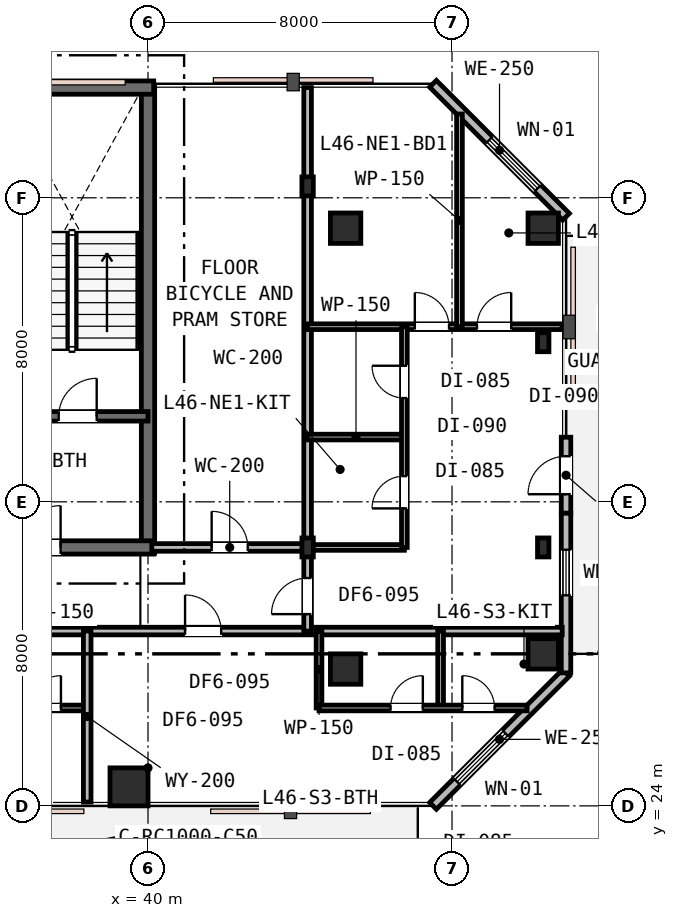
"""IFC4 building model, lengths in metres.
Left out: names, types, materials, properties, quantities, classifications, styles, units other than length and angle.
Written with IfcOpenShell. Run it as: python <this file> out.ifc"""

import sys

from ifc_helpers import new_model, si_unit, direction, frame, frame_2d, origin, origin_2d, place, context, subcontext, project, spatial, rectangle, i_section, extrude, element, fill, save


model = new_model("IFC4")
c1 = context("Model", 3, precision=1e-05, world=origin(), true_north=direction((0.0, 1.0)))
c2 = subcontext(c1, "Body", "Model", "MODEL_VIEW")
j1 = project(units=[si_unit("LENGTHUNIT", "METRE"), si_unit("PLANEANGLEUNIT", "RADIAN")], contexts=[c1])
p1 = place(None, origin())
s1 = spatial("IfcSite", under=j1, at=p1, CompositionType="ELEMENT")
p2 = place(p1, origin())
s2 = spatial("IfcBuilding", under=s1, at=p2, CompositionType="ELEMENT")
p3 = place(p2, frame((0.0, 0.0, 179.4)))
s3 = spatial("IfcBuildingStorey", under=s2, at=p3, CompositionType="ELEMENT", Elevation=179.4)
p4 = place(p3, frame((40.0, 30.65, 0.0), z_axis=(0.0, 0.0, 1.0), x_axis=(0.0, 1.0, 0.0)))
e1 = element("IfcWall", 1, at=p4, inside=s3, PredefinedType="SHEAR", context=c2, shape_type="SweptSolid", body=[
    extrude(rectangle(XDim=12.3, YDim=0.35, at=frame_2d((6.15, 0.0))), origin(), (0.0, 0.0, 1.0), 3.6),
])
p5 = place(p3, frame((15.85, 42.9, 0.0), z_axis=(0.0, 0.0, 1.0), x_axis=(1.0, 0.0, 0.0)))
e2 = element("IfcWall", 2, at=p5, inside=s3, PredefinedType="SHEAR", context=c2, shape_type="SweptSolid", body=[
    extrude(rectangle(XDim=24.3, YDim=0.35, at=frame_2d((12.15, 0.0))), origin(), (0.0, 0.0, 1.0), 3.6),
])
p6 = place(p3, frame((28.95, 30.8, 0.0), z_axis=(0.0, 0.0, 1.0), x_axis=(1.0, 0.0, 0.0)))
e3 = element("IfcWall", 3, at=p6, inside=s3, PredefinedType="SHEAR", context=c2, shape_type="SweptSolid", body=[
    extrude(rectangle(XDim=11.2, YDim=0.35, at=frame_2d((5.6, 0.0))), origin(), (0.0, 0.0, 1.0), 3.6),
])
p7 = place(p6, frame((7.65, 0.0, 0.0)))
e4 = element("IfcOpeningElement", 4, at=p7, cuts=e3, PredefinedType="OPENING", context=c2, shape_type="SweptSolid", body=[
    extrude(rectangle(XDim=1.1, YDim=2.15, at=frame_2d((0.55, 1.075))), frame((0.0, 0.185, 0.0), z_axis=(0.0, -1.0, 0.0), x_axis=(1.0, 0.0, 0.0)), (0.0, 0.0, 1.0), 0.37),
])
p8 = place(p3, frame((33.95, 34.25, 0.0), z_axis=(0.0, 0.0, 1.0), x_axis=(1.0, 0.0, 0.0)))
e5 = element("IfcWall", 5, at=p8, inside=s3, PredefinedType="SHEAR", context=c2, shape_type="SweptSolid", body=[
    extrude(rectangle(XDim=6.05, YDim=0.25, at=frame_2d((3.025, 0.0))), origin(), (0.0, 0.0, 1.0), 3.6),
])
p9 = place(p8, frame((3.7, 0.0, 0.0)))
e6 = element("IfcOpeningElement", 6, at=p9, cuts=e5, PredefinedType="OPENING", context=c2, shape_type="SweptSolid", body=[
    extrude(rectangle(XDim=1.0, YDim=2.15, at=frame_2d((0.5, 1.075))), frame((0.0, 0.135, 0.0), z_axis=(0.0, -1.0, 0.0), x_axis=(1.0, 0.0, 0.0)), (0.0, 0.0, 1.0), 0.27),
])
p10 = place(p8, frame((0.55, 0.0, 0.0)))
e7 = element("IfcOpeningElement", 7, at=p10, cuts=e5, PredefinedType="OPENING", context=c2, shape_type="SweptSolid", body=[
    extrude(rectangle(XDim=1.1, YDim=2.15, at=frame_2d((0.55, 1.075))), frame((0.0, 0.135, 0.0), z_axis=(0.0, -1.0, 0.0), x_axis=(1.0, 0.0, 0.0)), (0.0, 0.0, 1.0), 0.27),
])
p11 = place(p3, frame((39.5, 24.5, 0.0), z_axis=(0.0, 0.0, 1.0), x_axis=(1.0, 0.0, 0.0)))
e8 = element("IfcColumn", 8, at=p11, inside=s3, PredefinedType="COLUMN", context=c2, shape_type="SweptSolid", body=[
    extrude(rectangle(XDim=1.0, YDim=1.0, at=origin_2d()), origin(), (0.0, 0.0, 1.0), 3.6),
])
for number, where, z_axis, x_axis in (
    (9, (45.2, 27.6, 0.0), (0.0, 0.0, 1.0), (1.0, 0.0, 0.0)),
    (10, (45.2, 39.2, 0.0), (0.0, 0.0, 1.0), (1.0, 0.0, 0.0)),
    (11, (50.4, 28.0, 0.0), (0.0, 0.0, 1.0), (1.0, 0.0, 0.0)),
    (12, (50.4, 39.2, 0.0), (0.0, 0.0, 1.0), (1.0, 0.0, 0.0)),
):
    element("IfcColumn", number, at=place(p3, frame(where, z_axis=z_axis, x_axis=x_axis)), inside=s3, PredefinedType="COLUMN", context=c2, shape_type="SweptSolid", body=[
        extrude(rectangle(XDim=0.8, YDim=0.8, at=origin_2d()), origin(), (0.0, 0.0, 1.0), 3.6),
    ])
for number, where, z_axis, x_axis in (
    (13, (44.2, 30.8, 0.0), (0.0, 0.0, 1.0), (1.0, 0.0, 0.0)),
    (14, (44.2, 40.3, 0.0), (0.0, 0.0, 1.0), (1.0, 0.0, 0.0)),
    (15, (50.4, 30.8, 0.0), (0.0, 0.0, 1.0), (1.0, 0.0, 0.0)),
    (16, (50.4, 36.2, 0.0), (0.0, 0.0, 1.0), (1.0, 0.0, 0.0)),
):
    element("IfcColumn", number, at=place(p3, frame(where, z_axis=z_axis, x_axis=x_axis)), inside=s3, PredefinedType="COLUMN", context=c2, shape_type="SweptSolid", body=[
        extrude(i_section(OverallWidth=0.3, OverallDepth=0.5, WebThickness=0.015, FlangeThickness=0.028, FilletRadius=0.027, at=origin_2d()), origin(), (0.0, 0.0, 1.0), 3.6),
    ])
p12 = place(p3, frame((47.5, 24.0, 0.0), z_axis=(0.0, 0.0, 1.0), x_axis=(0.707106781187, 0.707106781187, 0.0)))
e17 = element("IfcWall", 17, at=p12, inside=s3, PredefinedType="STANDARD", context=c2, shape_type="SweptSolid", body=[
    extrude(rectangle(XDim=4.95, YDim=0.25, at=frame_2d((2.475, 0.0))), origin(), (0.0, 0.0, 1.0), 3.33),
])
p13 = place(p12, frame((0.896, 0.0, 0.75)))
e18 = element("IfcOpeningElement", 18, at=p13, cuts=e17, PredefinedType="OPENING", context=c2, shape_type="SweptSolid", body=[
    extrude(rectangle(XDim=1.8, YDim=1.85, at=frame_2d((0.9, 0.925))), frame((0.0, 0.135, 0.0), z_axis=(0.0, -1.0, 0.0), x_axis=(1.0, 0.0, 0.0)), (0.0, 0.0, 1.0), 0.27),
])
p14 = place(p3, frame((51.0, 31.7, 0.0), z_axis=(0.0, 0.0, 1.0), x_axis=(0.0, 1.0, 0.0)))
e19 = element("IfcWall", 19, at=p14, inside=s3, PredefinedType="STANDARD", context=c2, shape_type="SweptSolid", body=[
    extrude(rectangle(XDim=2.0, YDim=0.25, at=frame_2d((1.0, 0.0))), origin(), (0.0, 0.0, 1.0), 3.33),
])
p15 = place(p14, frame((0.5, 0.0, 0.0)))
e20 = element("IfcOpeningElement", 20, at=p15, cuts=e19, PredefinedType="OPENING", context=c2, shape_type="SweptSolid", body=[
    extrude(rectangle(XDim=1.0, YDim=2.15, at=frame_2d((0.5, 1.075))), frame((0.0, 0.135, 0.0), z_axis=(0.0, -1.0, 0.0), x_axis=(1.0, 0.0, 0.0)), (0.0, 0.0, 1.0), 0.27),
])
p16 = place(p3, frame((51.0, 27.5, 0.0), z_axis=(0.0, 0.0, 1.0), x_axis=(0.0, 1.0, 0.0)))
e21 = element("IfcWall", 21, at=p16, inside=s3, PredefinedType="STANDARD", context=c2, shape_type="SweptSolid", body=[
    extrude(rectangle(XDim=4.2, YDim=0.25, at=frame_2d((2.1, 0.0))), origin(), (0.0, 0.0, 1.0), 3.33),
])
p17 = place(p16, frame((2.04, 0.0, 0.85)))
e22 = element("IfcOpeningElement", 22, at=p17, cuts=e21, PredefinedType="OPENING", context=c2, shape_type="SweptSolid", body=[
    extrude(rectangle(XDim=1.2, YDim=1.6, at=frame_2d((0.6, 0.8))), frame((0.0, 0.135, 0.0), z_axis=(0.0, -1.0, 0.0), x_axis=(1.0, 0.0, 0.0)), (0.0, 0.0, 1.0), 0.27),
])
p18 = place(p3, frame((51.0, 39.5, 0.0), z_axis=(0.0, 0.0, 1.0), x_axis=(-0.707106781187, 0.707106781187, 0.0)))
e23 = element("IfcWall", 23, at=p18, inside=s3, PredefinedType="STANDARD", context=c2, shape_type="SweptSolid", body=[
    extrude(rectangle(XDim=4.95, YDim=0.25, at=frame_2d((2.475, 0.0))), origin(), (0.0, 0.0, 1.0), 3.33),
])
p19 = place(p18, frame((1.057, 0.0, 0.75)))
e24 = element("IfcOpeningElement", 24, at=p19, cuts=e23, PredefinedType="OPENING", context=c2, shape_type="SweptSolid", body=[
    extrude(rectangle(XDim=1.8, YDim=1.85, at=frame_2d((0.9, 0.925))), frame((0.0, 0.135, 0.0), z_axis=(0.0, -1.0, 0.0), x_axis=(1.0, 0.0, 0.0)), (0.0, 0.0, 1.0), 0.27),
])
p20 = place(p3, frame((21.6, 28.6, 0.0), z_axis=(0.0, 0.0, 1.0), x_axis=(1.0, 0.0, 0.0)))
e25 = element("IfcWall", 25, at=p20, inside=s3, PredefinedType="PARTITIONING", context=c2, shape_type="SweptSolid", body=[
    extrude(rectangle(XDim=29.3, YDim=0.2, at=frame_2d((14.65, 0.0))), origin(), (0.0, 0.0, 1.0), 2.92),
])
p21 = place(p20, frame((3.293, 0.0, 0.0)))
e26 = element("IfcOpeningElement", 26, at=p21, cuts=e25, PredefinedType="OPENING", context=c2, shape_type="SweptSolid", body=[
    extrude(rectangle(XDim=0.95, YDim=2.15, at=frame_2d((0.475, 1.075))), frame((0.0, 0.11, 0.0), z_axis=(0.0, -1.0, 0.0), x_axis=(1.0, 0.0, 0.0)), (0.0, 0.0, 1.0), 0.22),
])
p22 = place(p20, frame((10.493, 0.0, 0.0)))
e27 = element("IfcOpeningElement", 27, at=p22, cuts=e25, PredefinedType="OPENING", context=c2, shape_type="SweptSolid", body=[
    extrude(rectangle(XDim=0.95, YDim=2.15, at=frame_2d((0.475, 1.075))), frame((0.0, 0.11, 0.0), z_axis=(0.0, -1.0, 0.0), x_axis=(1.0, 0.0, 0.0)), (0.0, 0.0, 1.0), 0.22),
])
p23 = place(p20, frame((19.375, 0.0, 0.0)))
e28 = element("IfcOpeningElement", 28, at=p23, cuts=e25, PredefinedType="OPENING", context=c2, shape_type="SweptSolid", body=[
    extrude(rectangle(XDim=0.95, YDim=2.15, at=frame_2d((0.475, 1.075))), frame((0.0, 0.11, 0.0), z_axis=(0.0, -1.0, 0.0), x_axis=(1.0, 0.0, 0.0)), (0.0, 0.0, 1.0), 0.22),
])
p24 = place(p3, frame((40.1, 30.8, 0.0), z_axis=(0.0, 0.0, 1.0), x_axis=(1.0, 0.0, 0.0)))
e29 = element("IfcWall", 29, at=p24, inside=s3, PredefinedType="PARTITIONING", context=c2, shape_type="SweptSolid", body=[
    extrude(rectangle(XDim=4.1, YDim=0.2, at=frame_2d((2.05, 0.0))), origin(), (0.0, 0.0, 1.0), 2.92),
])
p25 = place(p24, frame((1.575, 0.0, 0.0)))
e30 = element("IfcOpeningElement", 30, at=p25, cuts=e29, PredefinedType="OPENING", context=c2, shape_type="SweptSolid", body=[
    extrude(rectangle(XDim=0.95, YDim=2.15, at=frame_2d((0.475, 1.075))), frame((0.0, 0.11, 0.0), z_axis=(0.0, -1.0, 0.0), x_axis=(1.0, 0.0, 0.0)), (0.0, 0.0, 1.0), 0.22),
])
p26 = place(p3, frame((44.2, 28.6, 0.0), z_axis=(0.0, 0.0, 1.0), x_axis=(0.0, 1.0, 0.0)))
e31 = element("IfcWall", 31, at=p26, inside=s3, PredefinedType="PARTITIONING", context=c2, shape_type="SweptSolid", body=[
    extrude(rectangle(XDim=14.3, YDim=0.2, at=frame_2d((7.15, 0.0))), origin(), (0.0, 0.0, 1.0), 2.92),
])
p27 = place(p26, frame((0.445, 0.0, 0.0)))
e32 = element("IfcOpeningElement", 32, at=p27, cuts=e31, PredefinedType="OPENING", context=c2, shape_type="SweptSolid", body=[
    extrude(rectangle(XDim=0.95, YDim=2.15, at=frame_2d((0.475, 1.075))), frame((0.0, 0.11, 0.0), z_axis=(0.0, -1.0, 0.0), x_axis=(1.0, 0.0, 0.0)), (0.0, 0.0, 1.0), 0.22),
])
for number, where, z_axis, x_axis in (
    (33, (44.2, 30.8, 0.0), (0.0, 0.0, 1.0), (1.0, 0.0, 0.0)),
    (34, (44.2, 33.704, 0.0), (0.0, 0.0, 1.0), (1.0, 0.0, 0.0)),
):
    element("IfcWall", number, at=place(p3, frame(where, z_axis=z_axis, x_axis=x_axis)), inside=s3, PredefinedType="PARTITIONING", context=c2, shape_type="SweptSolid", body=[
        extrude(rectangle(XDim=2.546, YDim=0.15, at=frame_2d((1.273, 0.0))), origin(), (0.0, 0.0, 1.0), 2.92),
    ])
p28 = place(p3, frame((44.2, 36.608, 0.0), z_axis=(0.0, 0.0, 1.0), x_axis=(1.0, 0.0, 0.0)))
e35 = element("IfcWall", 35, at=p28, inside=s3, PredefinedType="PARTITIONING", context=c2, shape_type="SweptSolid", body=[
    extrude(rectangle(XDim=6.7, YDim=0.15, at=frame_2d((3.35, 0.0))), origin(), (0.0, 0.0, 1.0), 2.92),
])
p29 = place(p28, frame((2.821, 0.0, 0.0)))
e36 = element("IfcOpeningElement", 36, at=p29, cuts=e35, PredefinedType="OPENING", context=c2, shape_type="SweptSolid", body=[
    extrude(rectangle(XDim=0.9, YDim=2.15, at=frame_2d((0.45, 1.075))), frame((0.0, 0.085, 0.0), z_axis=(0.0, -1.0, 0.0), x_axis=(1.0, 0.0, 0.0)), (0.0, 0.0, 1.0), 0.17),
])
p30 = place(p28, frame((4.457, 0.0, 0.0)))
e37 = element("IfcOpeningElement", 37, at=p30, cuts=e35, PredefinedType="OPENING", context=c2, shape_type="SweptSolid", body=[
    extrude(rectangle(XDim=0.9, YDim=2.15, at=frame_2d((0.45, 1.075))), frame((0.0, 0.085, 0.0), z_axis=(0.0, -1.0, 0.0), x_axis=(1.0, 0.0, 0.0)), (0.0, 0.0, 1.0), 0.17),
])
p31 = place(p3, frame((46.746, 30.8, 0.0), z_axis=(0.0, 0.0, 1.0), x_axis=(0.0, 1.0, 0.0)))
e38 = element("IfcWall", 38, at=p31, inside=s3, PredefinedType="PARTITIONING", context=c2, shape_type="SweptSolid", body=[
    extrude(rectangle(XDim=5.808, YDim=0.15, at=frame_2d((2.904, 0.0))), origin(), (0.0, 0.0, 1.0), 2.92),
])
p32 = place(p31, frame((1.027, 0.0, 0.0)))
e39 = element("IfcOpeningElement", 39, at=p32, cuts=e38, PredefinedType="OPENING", context=c2, shape_type="SweptSolid", body=[
    extrude(rectangle(XDim=0.85, YDim=2.15, at=frame_2d((0.425, 1.075))), frame((0.0, 0.085, 0.0), z_axis=(0.0, -1.0, 0.0), x_axis=(1.0, 0.0, 0.0)), (0.0, 0.0, 1.0), 0.17),
])
p33 = place(p31, frame((3.931, 0.0, 0.0)))
e40 = element("IfcOpeningElement", 40, at=p33, cuts=e38, PredefinedType="OPENING", context=c2, shape_type="SweptSolid", body=[
    extrude(rectangle(XDim=0.85, YDim=2.15, at=frame_2d((0.425, 1.075))), frame((0.0, 0.085, 0.0), z_axis=(0.0, -1.0, 0.0), x_axis=(1.0, 0.0, 0.0)), (0.0, 0.0, 1.0), 0.17),
])
p34 = place(p3, frame((48.196, 36.608, 0.0), z_axis=(0.0, 0.0, 1.0), x_axis=(0.0, 1.0, 0.0)))
e41 = element("IfcWall", 41, at=p34, inside=s3, PredefinedType="PARTITIONING", context=c2, shape_type="SweptSolid", body=[
    extrude(rectangle(XDim=5.596, YDim=0.15, at=frame_2d((2.798, 0.0))), origin(), (0.0, 0.0, 1.0), 3.02),
])
p35 = place(p3, frame((33.936, 26.576, 0.0), z_axis=(0.0, 0.0, 1.0), x_axis=(1.0, 0.0, 0.0)))
e42 = element("IfcWall", 42, at=p35, inside=s3, PredefinedType="PARTITIONING", context=c2, shape_type="SweptSolid", body=[
    extrude(rectangle(XDim=4.464, YDim=0.15, at=frame_2d((2.232, 0.0))), origin(), (0.0, 0.0, 1.0), 3.07),
])
p36 = place(p35, frame((0.691, 0.0, 0.0)))
e43 = element("IfcOpeningElement", 43, at=p36, cuts=e42, PredefinedType="OPENING", context=c2, shape_type="SweptSolid", body=[
    extrude(rectangle(XDim=0.85, YDim=2.15, at=frame_2d((0.425, 1.075))), frame((0.0, 0.085, 0.0), z_axis=(0.0, -1.0, 0.0), x_axis=(1.0, 0.0, 0.0)), (0.0, 0.0, 1.0), 0.17),
])
p37 = place(p35, frame((2.923, 0.0, 0.0)))
e44 = element("IfcOpeningElement", 44, at=p37, cuts=e42, PredefinedType="OPENING", context=c2, shape_type="SweptSolid", body=[
    extrude(rectangle(XDim=0.85, YDim=2.15, at=frame_2d((0.425, 1.075))), frame((0.0, 0.085, 0.0), z_axis=(0.0, -1.0, 0.0), x_axis=(1.0, 0.0, 0.0)), (0.0, 0.0, 1.0), 0.17),
])
p38 = place(p3, frame((38.4, 24.1, 0.0), z_axis=(0.0, 0.0, 1.0), x_axis=(0.0, 1.0, 0.0)))
e45 = element("IfcWall", 45, at=p38, inside=s3, PredefinedType="PARTITIONING", context=c2, shape_type="SweptSolid", body=[
    extrude(rectangle(XDim=4.5, YDim=0.2, at=frame_2d((2.25, 0.0))), origin(), (0.0, 0.0, 1.0), 3.02),
])
for number, where, z_axis, x_axis in (
    (46, (44.5, 26.576, 0.0), (0.0, 0.0, 1.0), (0.0, 1.0, 0.0)),
    (47, (47.7, 26.576, 0.0), (0.0, 0.0, 1.0), (0.0, 1.0, 0.0)),
):
    element("IfcWall", number, at=place(p3, frame(where, z_axis=z_axis, x_axis=x_axis)), inside=s3, PredefinedType="PARTITIONING", context=c2, shape_type="SweptSolid", body=[
        extrude(rectangle(XDim=2.024, YDim=0.15, at=frame_2d((1.012, 0.0))), origin(), (0.0, 0.0, 1.0), 3.33),
    ])
p39 = place(p3, frame((44.5, 26.576, 0.0), z_axis=(0.0, 0.0, 1.0), x_axis=(1.0, 0.0, 0.0)))
e48 = element("IfcWall", 48, at=p39, inside=s3, PredefinedType="PARTITIONING", context=c2, shape_type="SweptSolid", body=[
    extrude(rectangle(XDim=5.476, YDim=0.15, at=frame_2d((2.738, 0.0))), origin(), (0.0, 0.0, 1.0), 3.33),
])
p40 = place(p39, frame((1.882, 0.0, 0.0)))
e49 = element("IfcOpeningElement", 49, at=p40, cuts=e48, PredefinedType="OPENING", context=c2, shape_type="SweptSolid", body=[
    extrude(rectangle(XDim=0.85, YDim=2.15, at=frame_2d((0.425, 1.075))), frame((0.0, 0.085, 0.0), z_axis=(0.0, -1.0, 0.0), x_axis=(1.0, 0.0, 0.0)), (0.0, 0.0, 1.0), 0.17),
])
p41 = place(p39, frame((3.77, 0.0, 0.0)))
e50 = element("IfcOpeningElement", 50, at=p41, cuts=e48, PredefinedType="OPENING", context=c2, shape_type="SweptSolid", body=[
    extrude(rectangle(XDim=0.85, YDim=2.15, at=frame_2d((0.425, 1.075))), frame((0.0, 0.085, 0.0), z_axis=(0.0, -1.0, 0.0), x_axis=(1.0, 0.0, 0.0)), (0.0, 0.0, 1.0), 0.17),
])
p42 = place(p13, origin())
e51 = element("IfcWindow", 51, at=p42, inside=s3, PartitioningType="SINGLE_PANEL", PredefinedType="WINDOW", context=c2, shape_type="SweptSolid", body=[
    extrude(rectangle(XDim=1.8, YDim=1.85, at=frame_2d((0.9, 0.925))), frame((0.0, 0.03, 0.0), z_axis=(0.0, -1.0, 0.0), x_axis=(1.0, 0.0, 0.0)), (0.0, 0.0, 1.0), 0.06),
])
fill(e18, e51)
p43 = place(p15, origin())
e52 = element("IfcDoor", 52, at=p43, inside=s3, OperationType="SINGLE_SWING_LEFT", PredefinedType="DOOR", context=c2, shape_type="SweptSolid", body=[
    extrude(rectangle(XDim=1.0, YDim=2.15, at=frame_2d((0.5, 1.075))), frame((0.0, 0.025, 0.0), z_axis=(0.0, -1.0, 0.0), x_axis=(1.0, 0.0, 0.0)), (0.0, 0.0, 1.0), 0.05),
])
fill(e20, e52)
p44 = place(p17, origin())
e53 = element("IfcWindow", 53, at=p44, inside=s3, PartitioningType="SINGLE_PANEL", PredefinedType="WINDOW", context=c2, shape_type="SweptSolid", body=[
    extrude(rectangle(XDim=1.2, YDim=1.6, at=frame_2d((0.6, 0.8))), frame((0.0, 0.03, 0.0), z_axis=(0.0, -1.0, 0.0), x_axis=(1.0, 0.0, 0.0)), (0.0, 0.0, 1.0), 0.06),
])
fill(e22, e53)
p45 = place(p19, origin())
e54 = element("IfcWindow", 54, at=p45, inside=s3, PartitioningType="SINGLE_PANEL", PredefinedType="WINDOW", context=c2, shape_type="SweptSolid", body=[
    extrude(rectangle(XDim=1.8, YDim=1.85, at=frame_2d((0.9, 0.925))), frame((0.0, 0.03, 0.0), z_axis=(0.0, -1.0, 0.0), x_axis=(1.0, 0.0, 0.0)), (0.0, 0.0, 1.0), 0.06),
])
fill(e24, e54)
p46 = place(p9, origin())
e55 = element("IfcDoor", 55, at=p46, inside=s3, OperationType="SINGLE_SWING_RIGHT", PredefinedType="DOOR", context=c2, shape_type="SweptSolid", body=[
    extrude(rectangle(XDim=1.0, YDim=2.15, at=frame_2d((0.5, 1.075))), frame((0.0, 0.025, 0.0), z_axis=(0.0, -1.0, 0.0), x_axis=(1.0, 0.0, 0.0)), (0.0, 0.0, 1.0), 0.05),
])
fill(e6, e55)
p47 = place(p7, origin())
e56 = element("IfcDoor", 56, at=p47, inside=s3, OperationType="SINGLE_SWING_RIGHT", PredefinedType="DOOR", context=c2, shape_type="SweptSolid", body=[
    extrude(rectangle(XDim=1.1, YDim=2.15, at=frame_2d((0.55, 1.075))), frame((0.0, 0.025, 0.0), z_axis=(0.0, -1.0, 0.0), x_axis=(1.0, 0.0, 0.0)), (0.0, 0.0, 1.0), 0.05),
])
fill(e4, e56)
p48 = place(p25, origin())
e57 = element("IfcDoor", 57, at=p48, inside=s3, OperationType="SINGLE_SWING_LEFT", PredefinedType="DOOR", context=c2, shape_type="SweptSolid", body=[
    extrude(rectangle(XDim=0.95, YDim=2.15, at=frame_2d((0.475, 1.075))), frame((0.0, 0.025, 0.0), z_axis=(0.0, -1.0, 0.0), x_axis=(1.0, 0.0, 0.0)), (0.0, 0.0, 1.0), 0.05),
])
fill(e30, e57)
p49 = place(p27, origin())
e58 = element("IfcDoor", 58, at=p49, inside=s3, OperationType="SINGLE_SWING_LEFT", PredefinedType="DOOR", context=c2, shape_type="SweptSolid", body=[
    extrude(rectangle(XDim=0.95, YDim=2.15, at=frame_2d((0.475, 1.075))), frame((0.0, 0.025, 0.0), z_axis=(0.0, -1.0, 0.0), x_axis=(1.0, 0.0, 0.0)), (0.0, 0.0, 1.0), 0.05),
])
fill(e32, e58)
p50 = place(p32, origin())
e59 = element("IfcDoor", 59, at=p50, inside=s3, OperationType="SINGLE_SWING_LEFT", PredefinedType="DOOR", context=c2, shape_type="SweptSolid", body=[
    extrude(rectangle(XDim=0.85, YDim=2.15, at=frame_2d((0.425, 1.075))), frame((0.0, 0.025, 0.0), z_axis=(0.0, -1.0, 0.0), x_axis=(1.0, 0.0, 0.0)), (0.0, 0.0, 1.0), 0.05),
])
fill(e39, e59)
p51 = place(p33, origin())
e60 = element("IfcDoor", 60, at=p51, inside=s3, OperationType="SINGLE_SWING_RIGHT", PredefinedType="DOOR", context=c2, shape_type="SweptSolid", body=[
    extrude(rectangle(XDim=0.85, YDim=2.15, at=frame_2d((0.425, 1.075))), frame((0.0, 0.025, 0.0), z_axis=(0.0, -1.0, 0.0), x_axis=(1.0, 0.0, 0.0)), (0.0, 0.0, 1.0), 0.05),
])
fill(e40, e60)
p52 = place(p29, origin())
e61 = element("IfcDoor", 61, at=p52, inside=s3, OperationType="SINGLE_SWING_LEFT", PredefinedType="DOOR", context=c2, shape_type="SweptSolid", body=[
    extrude(rectangle(XDim=0.9, YDim=2.15, at=frame_2d((0.45, 1.075))), frame((0.0, 0.025, 0.0), z_axis=(0.0, -1.0, 0.0), x_axis=(1.0, 0.0, 0.0)), (0.0, 0.0, 1.0), 0.05),
])
fill(e36, e61)
p53 = place(p30, origin())
e62 = element("IfcDoor", 62, at=p53, inside=s3, OperationType="SINGLE_SWING_RIGHT", PredefinedType="DOOR", context=c2, shape_type="SweptSolid", body=[
    extrude(rectangle(XDim=0.9, YDim=2.15, at=frame_2d((0.45, 1.075))), frame((0.0, 0.025, 0.0), z_axis=(0.0, -1.0, 0.0), x_axis=(1.0, 0.0, 0.0)), (0.0, 0.0, 1.0), 0.05),
])
fill(e37, e62)
p54 = place(p37, origin())
e63 = element("IfcDoor", 63, at=p54, inside=s3, OperationType="SINGLE_SWING_RIGHT", PredefinedType="DOOR", context=c2, shape_type="SweptSolid", body=[
    extrude(rectangle(XDim=0.85, YDim=2.15, at=frame_2d((0.425, 1.075))), frame((0.0, 0.025, 0.0), z_axis=(0.0, -1.0, 0.0), x_axis=(1.0, 0.0, 0.0)), (0.0, 0.0, 1.0), 0.05),
])
fill(e44, e63)
p55 = place(p23, origin())
e64 = element("IfcDoor", 64, at=p55, inside=s3, OperationType="SINGLE_SWING_LEFT", PredefinedType="DOOR", context=c2, shape_type="SweptSolid", body=[
    extrude(rectangle(XDim=0.95, YDim=2.15, at=frame_2d((0.475, 1.075))), frame((0.0, 0.025, 0.0), z_axis=(0.0, -1.0, 0.0), x_axis=(1.0, 0.0, 0.0)), (0.0, 0.0, 1.0), 0.05),
])
fill(e28, e64)
p56 = place(p40, origin())
e65 = element("IfcDoor", 65, at=p56, inside=s3, OperationType="SINGLE_SWING_RIGHT", PredefinedType="DOOR", context=c2, shape_type="SweptSolid", body=[
    extrude(rectangle(XDim=0.85, YDim=2.15, at=frame_2d((0.425, 1.075))), frame((0.0, 0.025, 0.0), z_axis=(0.0, -1.0, 0.0), x_axis=(1.0, 0.0, 0.0)), (0.0, 0.0, 1.0), 0.05),
])
fill(e49, e65)
p57 = place(p41, origin())
e66 = element("IfcDoor", 66, at=p57, inside=s3, OperationType="SINGLE_SWING_LEFT", PredefinedType="DOOR", context=c2, shape_type="SweptSolid", body=[
    extrude(rectangle(XDim=0.85, YDim=2.15, at=frame_2d((0.425, 1.075))), frame((0.0, 0.025, 0.0), z_axis=(0.0, -1.0, 0.0), x_axis=(1.0, 0.0, 0.0)), (0.0, 0.0, 1.0), 0.05),
])
fill(e50, e66)
save(model, sys.argv[1])
